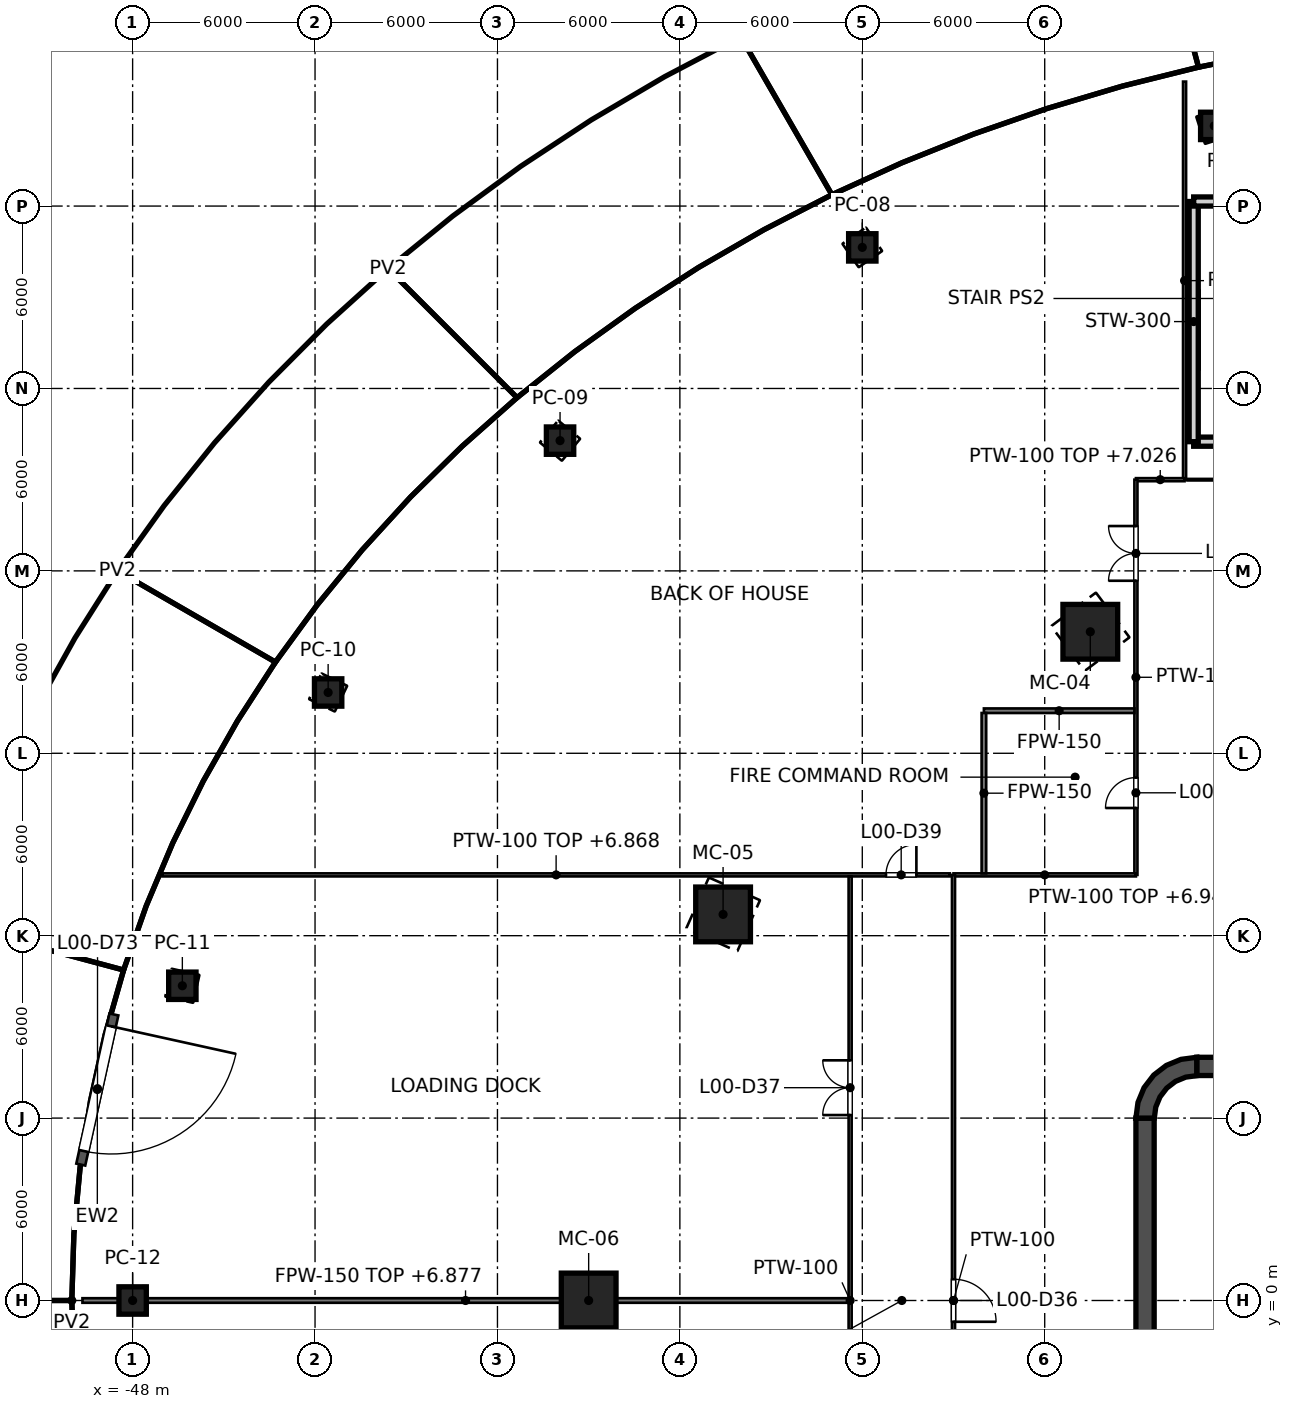
"""IFC4 building model, lengths in metres.
Left out: names, types, materials, properties, quantities, classifications, styles, units other than length and angle.
Written with IfcOpenShell. Run it as: python <this file> out.ifc"""

import sys

from ifc_helpers import new_model, si_unit, direction, frame, frame_2d, origin, origin_2d, place, context, subcontext, project, spatial, polyline, rectangle, hollow_rectangle, outline, extrude, element, fill, save


model = new_model("IFC4")
c1 = context("Model", 3, precision=1e-05, world=origin(), true_north=direction((0.0, 1.0)))
c2 = subcontext(c1, "Body", "Model", "MODEL_VIEW")
j1 = project(units=[si_unit("LENGTHUNIT", "METRE"), si_unit("PLANEANGLEUNIT", "RADIAN")], contexts=[c1])
p1 = place(None, origin())
s1 = spatial("IfcSite", under=j1, at=p1, CompositionType="ELEMENT")
p2 = place(p1, origin())
s2 = spatial("IfcBuilding", under=s1, at=p2, CompositionType="ELEMENT")
p3 = place(p2, origin())
s3 = spatial("IfcBuildingStorey", under=s2, at=p3, CompositionType="ELEMENT", Elevation=0.0)
for number, where, z_axis, x_axis in (
    (1, (-16.5, 21.997, 0.0), (0.0, 0.0, 1.0), (-0.6, 0.8, 0.0)),
    (2, (-28.579, 12.7, 0.0), (0.0, 0.0, 1.0), (-0.914, 0.406, 0.0)),
    (3, (-33.0, 0.0, 0.0), (0.0, 0.0, 1.0), (-1.0, 0.0, 0.0)),
):
    element("IfcColumn", number, at=place(p3, frame(where, z_axis=z_axis, x_axis=x_axis)), inside=s3, PredefinedType="COLUMN", context=c2, shape_type="SweptSolid", body=[
        extrude(hollow_rectangle(XDim=1.8, YDim=1.8, WallThickness=0.08, at=origin_2d()), origin(), (0.0, 0.0, 1.0), 8.0),
    ])
for number, where, z_axis, x_axis in (
    (4, (-12.423, 38.637, 0.0), (0.0, 0.0, 1.0), (-0.306, 0.952, 0.0)),
    (5, (-24.0, 34.641, 0.0), (0.0, 0.0, 1.0), (-0.569, 0.822, 0.0)),
    (6, (-33.941, 28.284, 0.0), (0.0, 0.0, 1.0), (-0.768, 0.64, 0.0)),
    (7, (-41.569, 20.0, 0.0), (0.0, 0.0, 1.0), (-0.901, 0.434, 0.0)),
    (8, (-46.365, 10.353, 0.0), (0.0, 0.0, 1.0), (-0.976, 0.218, 0.0)),
    (9, (-48.0, 0.0, 0.0), (0.0, 0.0, 1.0), (-1.0, 0.0, 0.0)),
):
    element("IfcColumn", number, at=place(p3, frame(where, z_axis=z_axis, x_axis=x_axis)), inside=s3, PredefinedType="COLUMN", context=c2, shape_type="SweptSolid", body=[
        extrude(hollow_rectangle(XDim=0.9, YDim=0.9, WallThickness=0.04, at=origin_2d()), origin(), (0.0, 0.0, 1.0), 8.0),
    ])
p4 = place(p3, frame((-13.0, 7.7, 0.0), z_axis=(0.0, 0.0, 1.0), x_axis=(1.0, 0.0, 0.0)))
e10 = element("IfcWall", 10, at=p4, inside=s3, PredefinedType="SHEAR", context=c2, shape_type="SweptSolid", body=[
    extrude(rectangle(XDim=26.0, YDim=0.6, at=frame_2d((13.0, 0.0))), origin(), (0.0, 0.0, 1.0), 8.0),
])
p5 = place(p4, frame((1.7, 0.0, 0.0)))
e11 = element("IfcOpeningElement", 11, at=p5, cuts=e10, PredefinedType="OPENING", context=c2, shape_type="SweptSolid", body=[
    extrude(rectangle(XDim=1.8, YDim=2.1, at=frame_2d((0.9, 1.05))), frame((0.0, 0.3, 0.0), z_axis=(0.0, -1.0, 0.0), x_axis=(1.0, 0.0, 0.0)), (0.0, 0.0, 1.0), 0.6),
])
p6 = place(p4, frame((22.5, 0.0, 0.0)))
e12 = element("IfcOpeningElement", 12, at=p6, cuts=e10, PredefinedType="OPENING", context=c2, shape_type="SweptSolid", body=[
    extrude(rectangle(XDim=1.8, YDim=2.1, at=frame_2d((0.9, 1.05))), frame((0.0, 0.3, 0.0), z_axis=(0.0, -1.0, 0.0), x_axis=(1.0, 0.0, 0.0)), (0.0, 0.0, 1.0), 0.6),
])
p7 = place(p3, frame((-14.7, -6.0, 0.0), z_axis=(0.0, 0.0, 1.0), x_axis=(0.0, 1.0, 0.0)))
e13 = element("IfcWall", 13, at=p7, inside=s3, PredefinedType="SHEAR", context=c2, shape_type="SweptSolid", body=[
    extrude(rectangle(XDim=12.0, YDim=0.6, at=frame_2d((6.0, 0.0))), origin(), (0.0, 0.0, 1.0), 8.0),
])
p8 = place(p3, origin())
e14 = element("IfcWall", 14, at=p8, inside=s3, PredefinedType="SHEAR", context=c2, shape_type="SweptSolid", body=[
    extrude(outline(polyline([(-15.0, 6.0), (-14.395, 6.0), (-14.347, 6.361), (-14.208, 6.698), (-13.986, 6.986), (-13.698, 7.208), (-13.361, 7.347), (-13.0, 7.395), (-13.0, 8.0), (-13.518, 7.932), (-14.0, 7.732), (-14.414, 7.414), (-14.732, 7.0), (-14.932, 6.518), (-15.0, 6.0)])), origin(), (0.0, 0.0, 1.0), 8.0),
])
p9 = place(p3, frame((-48.616, 9.409, 0.0), z_axis=(0.0, 0.0, 1.0), x_axis=(-0.215417103225, -0.976522130644, 0.0)))
e15 = element("IfcWall", 15, at=p9, inside=s3, PredefinedType="SOLIDWALL", context=c2, shape_type="SweptSolid", body=[
    extrude(rectangle(XDim=5.057, YDim=0.3, at=frame_2d((2.528, 0.0))), origin(), (0.0, 0.0, 1.0), 7.8),
])
p10 = place(p9, frame((0.4, 0.0, 0.0)))
e16 = element("IfcOpeningElement", 16, at=p10, cuts=e15, PredefinedType="OPENING", context=c2, shape_type="SweptSolid", body=[
    extrude(rectangle(XDim=4.2, YDim=4.5, at=frame_2d((2.1, 2.25))), frame((0.0, 0.15, 0.0), z_axis=(0.0, -1.0, 0.0), x_axis=(1.0, 0.0, 0.0)), (0.0, 0.0, 1.0), 0.3),
])
e17 = element("IfcWall", 17, at=p8, inside=s3, PredefinedType="SOLIDWALL", context=c2, shape_type="SweptSolid", body=[
    extrude(outline(polyline([(-12.0, -5.925), (-12.0, -5.675), (-14.15, -5.675), (-14.15, -3.025), (-12.0, -3.025), (-12.0, -2.775), (-14.15, -2.775), (-14.15, -0.125), (-12.0, -0.125), (-12.0, 0.125), (-14.15, 0.125), (-14.15, 2.775), (-12.0, 2.775), (-12.0, 3.025), (-14.15, 3.025), (-14.15, 5.675), (-12.0, 5.675), (-12.0, 5.925), (-14.15, 5.925), (-14.4, 5.925), (-14.4, 5.675), (-14.4, 3.025), (-14.4, 2.775), (-14.4, 0.125), (-14.4, -0.125), (-14.4, -2.775), (-14.4, -3.025), (-14.4, -5.675), (-14.4, -5.925), (-14.15, -5.925), (-12.0, -5.925)])), origin(), (0.0, 0.0, 1.0), 7.8),
])
p11 = place(p3, frame((-8.2, 28.25, 0.0), z_axis=(0.0, 0.0, 1.0), x_axis=(-1.0, 0.0, 0.0)))
e18 = element("IfcWall", 18, at=p11, inside=s3, PredefinedType="SOLIDWALL", context=c2, shape_type="SweptSolid", body=[
    extrude(rectangle(XDim=4.9, YDim=0.3, at=frame_2d((2.45, 0.0))), origin(), (0.0, 0.0, 1.0), 7.8),
])
p12 = place(p11, frame((1.85, 0.0, 0.0)))
e19 = element("IfcOpeningElement", 19, at=p12, cuts=e18, PredefinedType="OPENING", context=c2, shape_type="SweptSolid", body=[
    extrude(rectangle(XDim=1.2, YDim=2.1, at=frame_2d((0.6, 1.05))), frame((0.0, 0.15, 0.0), z_axis=(0.0, -1.0, 0.0), x_axis=(1.0, 0.0, 0.0)), (0.0, 0.0, 1.0), 0.3),
])
p13 = place(p3, frame((-13.1, 28.25, 0.0), z_axis=(0.0, 0.0, 1.0), x_axis=(0.0, 1.0, 0.0)))
e20 = element("IfcWall", 20, at=p13, inside=s3, PredefinedType="SOLIDWALL", context=c2, shape_type="SweptSolid", body=[
    extrude(rectangle(XDim=7.9, YDim=0.3, at=frame_2d((3.95, 0.0))), origin(), (0.0, 0.0, 1.0), 7.8),
])
p14 = place(p3, frame((-13.1, 36.15, 0.0), z_axis=(0.0, 0.0, 1.0), x_axis=(1.0, 0.0, 0.0)))
e21 = element("IfcWall", 21, at=p14, inside=s3, PredefinedType="SOLIDWALL", context=c2, shape_type="SweptSolid", body=[
    extrude(rectangle(XDim=4.9, YDim=0.3, at=frame_2d((2.45, 0.0))), origin(), (0.0, 0.0, 1.0), 7.8),
])
p15 = place(p3, frame((-13.4, 40.094, 0.0), z_axis=(0.0, 0.0, 1.0), x_axis=(0.0, -1.0, 0.0)))
e22 = element("IfcWall", 22, at=p15, inside=s3, PredefinedType="PARTITIONING", context=c2, shape_type="SweptSolid", body=[
    extrude(rectangle(XDim=13.094, YDim=0.1, at=frame_2d((6.547, 0.0))), origin(), (0.0, 0.0, 1.0), 6.877),
])
p16 = place(p3, frame((-13.4, 27.0, 0.0), z_axis=(0.0, 0.0, 1.0), x_axis=(-1.0, 0.0, 0.0)))
e23 = element("IfcWall", 23, at=p16, inside=s3, PredefinedType="PARTITIONING", context=c2, shape_type="SweptSolid", body=[
    extrude(rectangle(XDim=1.6, YDim=0.1, at=frame_2d((0.8, 0.0))), origin(), (0.0, 0.0, 1.0), 7.026),
])
p17 = place(p3, frame((-15.0, 27.0, 0.0), z_axis=(0.0, 0.0, 1.0), x_axis=(0.0, -1.0, 0.0)))
e24 = element("IfcWall", 24, at=p17, inside=s3, PredefinedType="PARTITIONING", context=c2, shape_type="SweptSolid", body=[
    extrude(rectangle(XDim=13.0, YDim=0.1, at=frame_2d((6.5, 0.0))), origin(), (0.0, 0.0, 1.0), 6.868),
])
p18 = place(p17, frame((1.525, 0.0, 0.0)))
e25 = element("IfcOpeningElement", 25, at=p18, cuts=e24, PredefinedType="OPENING", context=c2, shape_type="SweptSolid", body=[
    extrude(rectangle(XDim=1.8, YDim=2.1, at=frame_2d((0.9, 1.05))), frame((0.0, 0.05, 0.0), z_axis=(0.0, -1.0, 0.0), x_axis=(1.0, 0.0, 0.0)), (0.0, 0.0, 1.0), 0.1),
])
p19 = place(p17, frame((9.8, 0.0, 0.0)))
e26 = element("IfcOpeningElement", 26, at=p19, cuts=e24, PredefinedType="OPENING", context=c2, shape_type="SweptSolid", body=[
    extrude(rectangle(XDim=1.0, YDim=2.1, at=frame_2d((0.5, 1.05))), frame((0.0, 0.05, 0.0), z_axis=(0.0, -1.0, 0.0), x_axis=(1.0, 0.0, 0.0)), (0.0, 0.0, 1.0), 0.1),
])
p20 = place(p3, frame((-15.0, 14.0, 0.0), z_axis=(0.0, 0.0, 1.0), x_axis=(-1.0, 0.0, 0.0)))
e27 = element("IfcWall", 27, at=p20, inside=s3, PredefinedType="PARTITIONING", context=c2, shape_type="SweptSolid", body=[
    extrude(rectangle(XDim=6.0, YDim=0.1, at=frame_2d((3.0, 0.0))), origin(), (0.0, 0.0, 1.0), 6.945),
])
p21 = place(p3, frame((-21.0, 14.0, 0.0), z_axis=(0.0, 0.0, 1.0), x_axis=(0.0, -1.0, 0.0)))
e28 = element("IfcWall", 28, at=p21, inside=s3, PredefinedType="PARTITIONING", context=c2, shape_type="SweptSolid", body=[
    extrude(rectangle(XDim=28.0, YDim=0.1, at=frame_2d((14.0, 0.0))), origin(), (0.0, 0.0, 1.0), 6.877),
])
p22 = place(p21, frame((13.3, 0.0, 0.0)))
e29 = element("IfcOpeningElement", 29, at=p22, cuts=e28, PredefinedType="OPENING", context=c2, shape_type="SweptSolid", body=[
    extrude(rectangle(XDim=1.4, YDim=2.1, at=frame_2d((0.7, 1.05))), frame((0.0, 0.05, 0.0), z_axis=(0.0, -1.0, 0.0), x_axis=(1.0, 0.0, 0.0)), (0.0, 0.0, 1.0), 0.1),
])
p23 = place(p3, frame((-13.304, 27.0, 0.0), z_axis=(0.0, 0.0, 1.0), x_axis=(1.0, 0.0, 0.0)))
e30 = element("IfcWall", 30, at=p23, inside=s3, PredefinedType="PARTITIONING", context=c2, shape_type="SweptSolid", body=[
    extrude(rectangle(XDim=26.608, YDim=0.05, at=frame_2d((13.304, 0.0))), origin(), (0.0, 0.0, 1.0), 7.026),
])
p24 = place(p23, frame((3.796, 0.0, 0.0)))
e31 = element("IfcOpeningElement", 31, at=p24, cuts=e30, PredefinedType="OPENING", context=c2, shape_type="SweptSolid", body=[
    extrude(rectangle(XDim=2.7, YDim=2.4, at=frame_2d((1.35, 1.2))), frame((0.0, 0.025, 0.0), z_axis=(0.0, -1.0, 0.0), x_axis=(1.0, 0.0, 0.0)), (0.0, 0.0, 1.0), 0.05),
])
p25 = place(p23, frame((14.868, 0.0, 0.0)))
e32 = element("IfcOpeningElement", 32, at=p25, cuts=e30, PredefinedType="OPENING", context=c2, shape_type="SweptSolid", body=[
    extrude(rectangle(XDim=2.7, YDim=2.4, at=frame_2d((1.35, 1.2))), frame((0.0, 0.025, 0.0), z_axis=(0.0, -1.0, 0.0), x_axis=(1.0, 0.0, 0.0)), (0.0, 0.0, 1.0), 0.05),
])
p26 = place(p23, frame((20.112, 0.0, 0.0)))
e33 = element("IfcOpeningElement", 33, at=p26, cuts=e30, PredefinedType="OPENING", context=c2, shape_type="SweptSolid", body=[
    extrude(rectangle(XDim=2.7, YDim=2.4, at=frame_2d((1.35, 1.2))), frame((0.0, 0.025, 0.0), z_axis=(0.0, -1.0, 0.0), x_axis=(1.0, 0.0, 0.0)), (0.0, 0.0, 1.0), 0.05),
])
p27 = place(p3, frame((-21.121, 14.0, 0.0), z_axis=(0.0, 0.0, 1.0), x_axis=(-1.0, 0.0, 0.0)))
e34 = element("IfcWall", 34, at=p27, inside=s3, PredefinedType="PARTITIONING", context=c2, shape_type="SweptSolid", body=[
    extrude(rectangle(XDim=25.9, YDim=0.1, at=frame_2d((12.95, 0.0))), origin(), (0.0, 0.0, 1.0), 6.868),
])
p28 = place(p27, frame((1.1, 0.0, 0.0)))
e35 = element("IfcOpeningElement", 35, at=p28, cuts=e34, PredefinedType="OPENING", context=c2, shape_type="SweptSolid", body=[
    extrude(rectangle(XDim=1.0, YDim=2.1, at=frame_2d((0.5, 1.05))), frame((0.0, 0.05, 0.0), z_axis=(0.0, -1.0, 0.0), x_axis=(1.0, 0.0, 0.0)), (0.0, 0.0, 1.0), 0.1),
])
p29 = place(p3, frame((-24.4, 13.95, 0.0), z_axis=(0.0, 0.0, 1.0), x_axis=(0.0, -1.0, 0.0)))
e36 = element("IfcWall", 36, at=p29, inside=s3, PredefinedType="PARTITIONING", context=c2, shape_type="SweptSolid", body=[
    extrude(rectangle(XDim=27.9, YDim=0.1, at=frame_2d((13.95, 0.0))), origin(), (0.0, 0.0, 1.0), 6.877),
])
p30 = place(p29, frame((6.05, 0.0, 0.0)))
e37 = element("IfcOpeningElement", 37, at=p30, cuts=e36, PredefinedType="OPENING", context=c2, shape_type="SweptSolid", body=[
    extrude(rectangle(XDim=1.8, YDim=2.1, at=frame_2d((0.9, 1.05))), frame((0.0, 0.05, 0.0), z_axis=(0.0, -1.0, 0.0), x_axis=(1.0, 0.0, 0.0)), (0.0, 0.0, 1.0), 0.1),
])
p31 = place(p29, frame((20.05, 0.0, 0.0)))
e38 = element("IfcOpeningElement", 38, at=p31, cuts=e36, PredefinedType="OPENING", context=c2, shape_type="SweptSolid", body=[
    extrude(rectangle(XDim=1.8, YDim=2.1, at=frame_2d((0.9, 1.05))), frame((0.0, 0.05, 0.0), z_axis=(0.0, -1.0, 0.0), x_axis=(1.0, 0.0, 0.0)), (0.0, 0.0, 1.0), 0.1),
])
p32 = place(p3, frame((-49.65, 0.0, 0.0), z_axis=(0.0, 0.0, 1.0), x_axis=(1.0, 0.0, 0.0)))
e39 = element("IfcWall", 39, at=p32, inside=s3, PredefinedType="PARTITIONING", context=c2, shape_type="SweptSolid", body=[
    extrude(rectangle(XDim=25.2, YDim=0.15, at=frame_2d((12.6, 0.0))), origin(), (0.0, 0.0, 1.0), 6.877),
])
p33 = place(p3, frame((-20.0, 19.4, 0.0), z_axis=(0.0, 0.0, 1.0), x_axis=(1.0, 0.0, 0.0)))
e40 = element("IfcWall", 40, at=p33, inside=s3, PredefinedType="PARTITIONING", context=c2, shape_type="SweptSolid", body=[
    extrude(rectangle(XDim=4.95, YDim=0.15, at=frame_2d((2.475, 0.0))), origin(), (0.0, 0.0, 1.0), 6.868),
])
p34 = place(p3, frame((-20.0, 14.05, 0.0), z_axis=(0.0, 0.0, 1.0), x_axis=(0.0, 1.0, 0.0)))
e41 = element("IfcWall", 41, at=p34, inside=s3, PredefinedType="PARTITIONING", context=c2, shape_type="SweptSolid", body=[
    extrude(rectangle(XDim=5.275, YDim=0.15, at=frame_2d((2.637, 0.0))), origin(), (0.0, 0.0, 1.0), 6.868),
])
p35 = place(p10, origin())
e42 = element("IfcDoor", 42, at=p35, inside=s3, OperationType="ROLLINGUP", PredefinedType="DOOR", context=c2, shape_type="SweptSolid", body=[
    extrude(rectangle(XDim=4.2, YDim=4.5, at=frame_2d((2.1, 2.25))), frame((0.0, 0.025, 0.0), z_axis=(0.0, -1.0, 0.0), x_axis=(1.0, 0.0, 0.0)), (0.0, 0.0, 1.0), 0.05),
])
fill(e16, e42)
p36 = place(p18, origin())
e43 = element("IfcDoor", 43, at=p36, inside=s3, OperationType="DOUBLE_DOOR_SINGLE_SWING", PredefinedType="DOOR", context=c2, shape_type="SweptSolid", body=[
    extrude(rectangle(XDim=1.8, YDim=2.1, at=frame_2d((0.9, 1.05))), frame((0.0, 0.025, 0.0), z_axis=(0.0, -1.0, 0.0), x_axis=(1.0, 0.0, 0.0)), (0.0, 0.0, 1.0), 0.05),
])
fill(e25, e43)
p37 = place(p19, origin())
e44 = element("IfcDoor", 44, at=p37, inside=s3, OperationType="SINGLE_SWING_RIGHT", PredefinedType="DOOR", context=c2, shape_type="SweptSolid", body=[
    extrude(rectangle(XDim=1.0, YDim=2.1, at=frame_2d((0.5, 1.05))), frame((0.0, 0.025, 0.0), z_axis=(0.0, -1.0, 0.0), x_axis=(1.0, 0.0, 0.0)), (0.0, 0.0, 1.0), 0.05),
])
fill(e26, e44)
p38 = place(p22, origin())
e45 = element("IfcDoor", 45, at=p38, inside=s3, OperationType="SINGLE_SWING_RIGHT", PredefinedType="DOOR", context=c2, shape_type="SweptSolid", body=[
    extrude(rectangle(XDim=1.4, YDim=2.1, at=frame_2d((0.7, 1.05))), frame((0.0, 0.025, 0.0), z_axis=(0.0, -1.0, 0.0), x_axis=(1.0, 0.0, 0.0)), (0.0, 0.0, 1.0), 0.05),
])
fill(e29, e45)
p39 = place(p30, origin())
e46 = element("IfcDoor", 46, at=p39, inside=s3, OperationType="DOUBLE_DOOR_SINGLE_SWING", PredefinedType="DOOR", context=c2, shape_type="SweptSolid", body=[
    extrude(rectangle(XDim=1.8, YDim=2.1, at=frame_2d((0.9, 1.05))), frame((0.0, 0.025, 0.0), z_axis=(0.0, -1.0, 0.0), x_axis=(1.0, 0.0, 0.0)), (0.0, 0.0, 1.0), 0.05),
])
fill(e37, e46)
p40 = place(p28, origin())
e47 = element("IfcDoor", 47, at=p40, inside=s3, OperationType="SINGLE_SWING_LEFT", PredefinedType="DOOR", context=c2, shape_type="SweptSolid", body=[
    extrude(rectangle(XDim=1.0, YDim=2.1, at=frame_2d((0.5, 1.05))), frame((0.0, 0.025, 0.0), z_axis=(0.0, -1.0, 0.0), x_axis=(1.0, 0.0, 0.0)), (0.0, 0.0, 1.0), 0.05),
])
fill(e35, e47)
save(model, sys.argv[1])
